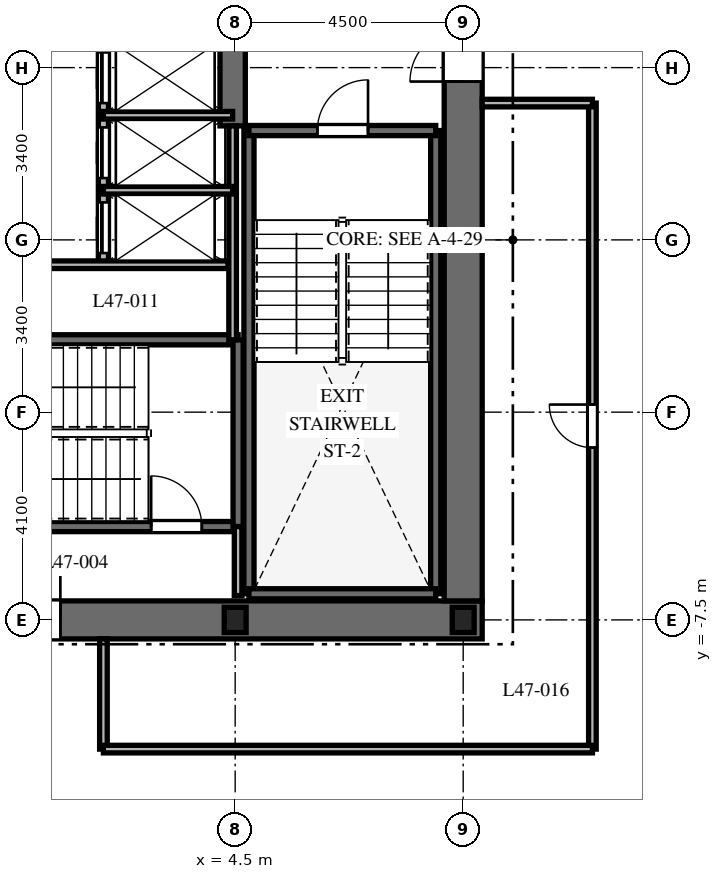
"""IFC4 building model, lengths in metres.
Left out: names, types, materials, properties, quantities, classifications, styles, units other than length and angle.
Written with IfcOpenShell. Run it as: python <this file> out.ifc"""

import sys

from ifc_helpers import new_model, si_unit, direction, frame, frame_2d, origin, origin_2d, place, context, subcontext, project, spatial, rectangle, i_section, extrude, element, fill, save


model = new_model("IFC4")
c1 = context("Model", 3, precision=1e-05, world=origin(), true_north=direction((0.0, 1.0)))
c2 = subcontext(c1, "Body", "Model", "MODEL_VIEW")
j1 = project(units=[si_unit("LENGTHUNIT", "METRE"), si_unit("PLANEANGLEUNIT", "RADIAN")], contexts=[c1])
p1 = place(None, origin())
s1 = spatial("IfcSite", under=j1, at=p1, CompositionType="ELEMENT")
p2 = place(p1, origin())
s2 = spatial("IfcBuilding", under=s1, at=p2, CompositionType="ELEMENT")
p3 = place(p2, frame((0.0, 0.0, 190.4)))
s3 = spatial("IfcBuildingStorey", under=s2, at=p3, CompositionType="ELEMENT", Elevation=190.4)
p4 = place(p3, frame((-9.375, -7.5, 0.0), z_axis=(0.0, 0.0, 1.0), x_axis=(1.0, 0.0, 0.0)))
e1 = element("IfcWall", 1, at=p4, inside=s3, PredefinedType="SHEAR", context=c2, shape_type="SweptSolid", body=[
    extrude(rectangle(XDim=18.75, YDim=0.75, at=frame_2d((9.375, 0.0))), origin(), (0.0, 0.0, 1.0), 3.7),
])
p5 = place(p4, frame((9.425, 0.0, 0.0)))
e2 = element("IfcOpeningElement", 2, at=p5, cuts=e1, PredefinedType="OPENING", context=c2, shape_type="SweptSolid", body=[
    extrude(rectangle(XDim=1.0, YDim=2.15, at=frame_2d((0.5, 1.075))), frame((0.0, 0.385, 0.0), z_axis=(0.0, -1.0, 0.0), x_axis=(1.0, 0.0, 0.0)), (0.0, 0.0, 1.0), 0.77),
])
p6 = place(p3, frame((9.0, -7.125, 0.0), z_axis=(0.0, 0.0, 1.0), x_axis=(0.0, 1.0, 0.0)))
e3 = element("IfcWall", 3, at=p6, inside=s3, PredefinedType="SHEAR", context=c2, shape_type="SweptSolid", body=[
    extrude(rectangle(XDim=14.25, YDim=0.75, at=frame_2d((7.125, 0.0))), origin(), (0.0, 0.0, 1.0), 3.7),
])
p7 = place(p6, frame((10.25, 0.0, 0.0)))
e4 = element("IfcOpeningElement", 4, at=p7, cuts=e3, PredefinedType="OPENING", context=c2, shape_type="SweptSolid", body=[
    extrude(rectangle(XDim=1.05, YDim=2.15, at=frame_2d((0.525, 1.075))), frame((0.0, 0.385, 0.0), z_axis=(0.0, -1.0, 0.0), x_axis=(1.0, 0.0, 0.0)), (0.0, 0.0, 1.0), 0.77),
])
p8 = place(p3, frame((4.45, 2.25, 0.0), z_axis=(0.0, 0.0, 1.0), x_axis=(0.0, 1.0, 0.0)))
e5 = element("IfcWall", 5, at=p8, inside=s3, PredefinedType="SHEAR", context=c2, shape_type="SweptSolid", body=[
    extrude(rectangle(XDim=4.875, YDim=0.5, at=frame_2d((2.438, 0.0))), origin(), (0.0, 0.0, 1.0), 3.7),
])
for number, where, z_axis, x_axis in (
    (6, (4.772, -6.985, 0.0), (0.0, 0.0, 1.0), (0.0, 1.0, 0.0)),
    (7, (8.458, -6.985, 0.0), (0.0, 0.0, 1.0), (0.0, 1.0, 0.0)),
):
    element("IfcWall", number, at=place(p3, frame(where, z_axis=z_axis, x_axis=x_axis)), inside=s3, PredefinedType="SHEAR", context=c2, shape_type="SweptSolid", body=[
        extrude(rectangle(XDim=9.143, YDim=0.2, at=frame_2d((4.572, 0.0))), origin(), (0.0, 0.0, 1.0), 3.7),
    ])
p9 = place(p3, frame((4.772, -6.985, 0.0), z_axis=(0.0, 0.0, 1.0), x_axis=(1.0, 0.0, 0.0)))
e8 = element("IfcWall", 8, at=p9, inside=s3, PredefinedType="SHEAR", context=c2, shape_type="SweptSolid", body=[
    extrude(rectangle(XDim=3.686, YDim=0.2, at=frame_2d((1.843, 0.0))), origin(), (0.0, 0.0, 1.0), 3.7),
])
p10 = place(p3, frame((4.772, 2.158, 0.0), z_axis=(0.0, 0.0, 1.0), x_axis=(1.0, 0.0, 0.0)))
e9 = element("IfcWall", 9, at=p10, inside=s3, PredefinedType="SHEAR", context=c2, shape_type="SweptSolid", body=[
    extrude(rectangle(XDim=3.686, YDim=0.2, at=frame_2d((1.843, 0.0))), origin(), (0.0, 0.0, 1.0), 3.7),
])
p11 = place(p10, frame((1.35, 0.0, 0.0)))
e10 = element("IfcOpeningElement", 10, at=p11, cuts=e9, PredefinedType="OPENING", context=c2, shape_type="SweptSolid", body=[
    extrude(rectangle(XDim=1.0, YDim=2.15, at=frame_2d((0.5, 1.075))), frame((0.0, 0.11, 0.0), z_axis=(0.0, -1.0, 0.0), x_axis=(1.0, 0.0, 0.0)), (0.0, 0.0, 1.0), 0.22),
])
p12 = place(p3, frame((-4.608, -5.658, 0.0), z_axis=(0.0, 0.0, 1.0), x_axis=(1.0, 0.0, 0.0)))
e11 = element("IfcWall", 11, at=p12, inside=s3, PredefinedType="SHEAR", context=c2, shape_type="SweptSolid", body=[
    extrude(rectangle(XDim=9.166, YDim=0.2, at=frame_2d((4.583, 0.0))), origin(), (0.0, 0.0, 1.0), 3.7),
])
p13 = place(p12, frame((7.45, 0.0, 0.0)))
e12 = element("IfcOpeningElement", 12, at=p13, cuts=e11, PredefinedType="OPENING", context=c2, shape_type="SweptSolid", body=[
    extrude(rectangle(XDim=1.0, YDim=2.15, at=frame_2d((0.5, 1.075))), frame((0.0, 0.11, 0.0), z_axis=(0.0, -1.0, 0.0), x_axis=(1.0, 0.0, 0.0)), (0.0, 0.0, 1.0), 0.22),
])
p14 = place(p3, frame((-4.608, -1.972, 0.0), z_axis=(0.0, 0.0, 1.0), x_axis=(1.0, 0.0, 0.0)))
e13 = element("IfcWall", 13, at=p14, inside=s3, PredefinedType="SHEAR", context=c2, shape_type="SweptSolid", body=[
    extrude(rectangle(XDim=9.166, YDim=0.2, at=frame_2d((4.583, 0.0))), origin(), (0.0, 0.0, 1.0), 3.7),
])
p15 = place(p3, frame((4.558, -5.658, 0.0), z_axis=(0.0, 0.0, 1.0), x_axis=(0.0, 1.0, 0.0)))
e14 = element("IfcWall", 14, at=p15, inside=s3, PredefinedType="SHEAR", context=c2, shape_type="SweptSolid", body=[
    extrude(rectangle(XDim=3.686, YDim=0.2, at=frame_2d((1.843, 0.0))), origin(), (0.0, 0.0, 1.0), 3.7),
])
for number, where, z_axis, x_axis in (
    (15, (4.5, -7.5, 0.0), (0.0, 0.0, 1.0), (1.0, 0.0, 0.0)),
    (16, (9.0, -7.5, 0.0), (0.0, 0.0, 1.0), (1.0, 0.0, 0.0)),
):
    element("IfcColumn", number, at=place(p3, frame(where, z_axis=z_axis, x_axis=x_axis)), inside=s3, PredefinedType="COLUMN", context=c2, shape_type="SweptSolid", body=[
        extrude(i_section(OverallWidth=0.432, OverallDepth=0.498, WebThickness=0.056, FlangeThickness=0.089, at=origin_2d()), origin(), (0.0, 0.0, 1.0), 3.7),
    ])
p16 = place(p3, frame((4.558, -7.02, 0.0), z_axis=(0.0, 0.0, 1.0), x_axis=(0.0, 1.0, 0.0)))
e17 = element("IfcWall", 17, at=p16, inside=s3, PredefinedType="PARTITIONING", context=c2, shape_type="SweptSolid", body=[
    extrude(rectangle(XDim=1.362, YDim=0.15, at=frame_2d((0.681, 0.0))), origin(), (0.0, 0.0, 1.0), 3.4),
])
p17 = place(p3, frame((4.45, -1.972, 0.0), z_axis=(0.0, 0.0, 1.0), x_axis=(0.0, 1.0, 0.0)))
e18 = element("IfcWall", 18, at=p17, inside=s3, PredefinedType="PARTITIONING", context=c2, shape_type="SweptSolid", body=[
    extrude(rectangle(XDim=4.222, YDim=0.15, at=frame_2d((2.111, 0.0))), origin(), (0.0, 0.0, 1.0), 3.4),
])
p18 = place(p3, frame((1.9, -0.5, 0.0), z_axis=(0.0, 0.0, 1.0), x_axis=(0.0, 1.0, 0.0)))
e19 = element("IfcWall", 19, at=p18, inside=s3, PredefinedType="PARTITIONING", context=c2, shape_type="SweptSolid", body=[
    extrude(rectangle(XDim=4.44, YDim=0.2, at=frame_2d((2.22, 0.0))), origin(), (0.0, 0.0, 1.0), 3.4),
])
p19 = place(p18, frame((0.24, 0.0, 0.0)))
e20 = element("IfcOpeningElement", 20, at=p19, cuts=e19, PredefinedType="OPENING", context=c2, shape_type="SweptSolid", body=[
    extrude(rectangle(XDim=1.0, YDim=2.2, at=frame_2d((0.5, 1.1))), frame((0.0, 0.11, 0.0), z_axis=(0.0, -1.0, 0.0), x_axis=(1.0, 0.0, 0.0)), (0.0, 0.0, 1.0), 0.22),
])
p20 = place(p18, frame((1.72, 0.0, 0.0)))
e21 = element("IfcOpeningElement", 21, at=p20, cuts=e19, PredefinedType="OPENING", context=c2, shape_type="SweptSolid", body=[
    extrude(rectangle(XDim=1.0, YDim=2.2, at=frame_2d((0.5, 1.1))), frame((0.0, 0.11, 0.0), z_axis=(0.0, -1.0, 0.0), x_axis=(1.0, 0.0, 0.0)), (0.0, 0.0, 1.0), 0.22),
])
p21 = place(p18, frame((3.2, 0.0, 0.0)))
e22 = element("IfcOpeningElement", 22, at=p21, cuts=e19, PredefinedType="OPENING", context=c2, shape_type="SweptSolid", body=[
    extrude(rectangle(XDim=1.0, YDim=2.2, at=frame_2d((0.5, 1.1))), frame((0.0, 0.11, 0.0), z_axis=(0.0, -1.0, 0.0), x_axis=(1.0, 0.0, 0.0)), (0.0, 0.0, 1.0), 0.22),
])
for number, where, z_axis, x_axis in (
    (23, (1.9, 0.98, 0.0), (0.0, 0.0, 1.0), (1.0, 0.0, 0.0)),
    (24, (1.9, 2.46, 0.0), (0.0, 0.0, 1.0), (1.0, 0.0, 0.0)),
):
    element("IfcWall", number, at=place(p3, frame(where, z_axis=z_axis, x_axis=x_axis)), inside=s3, PredefinedType="PARTITIONING", context=c2, shape_type="SweptSolid", body=[
        extrude(rectangle(XDim=2.55, YDim=0.15, at=frame_2d((1.275, 0.0))), origin(), (0.0, 0.0, 1.0), 3.4),
    ])
p22 = place(p3, frame((-4.36, -0.49, 0.0), z_axis=(0.0, 0.0, 1.0), x_axis=(1.0, 0.0, 0.0)))
e25 = element("IfcWall", 25, at=p22, inside=s3, PredefinedType="PARTITIONING", context=c2, shape_type="SweptSolid", body=[
    extrude(rectangle(XDim=8.72, YDim=0.15, at=frame_2d((4.36, 0.0))), origin(), (0.0, 0.0, 1.0), 3.4),
])
p23 = place(p22, frame((3.86, 0.0, 0.0)))
e26 = element("IfcOpeningElement", 26, at=p23, cuts=e25, PredefinedType="OPENING", context=c2, shape_type="SweptSolid", body=[
    extrude(rectangle(XDim=0.9, YDim=2.03, at=frame_2d((0.45, 1.015))), frame((0.0, 0.085, 0.0), z_axis=(0.0, -1.0, 0.0), x_axis=(1.0, 0.0, 0.0)), (0.0, 0.0, 1.0), 0.17),
])
p24 = place(p3, frame((11.55, -10.05, 0.0), z_axis=(0.0, 0.0, 1.0), x_axis=(0.0, 1.0, 0.0)))
e27 = element("IfcWall", 27, at=p24, inside=s3, PredefinedType="PARTITIONING", context=c2, shape_type="SweptSolid", body=[
    extrude(rectangle(XDim=12.75, YDim=0.15, at=frame_2d((6.375, 0.0))), origin(), (0.0, 0.0, 1.0), 2.84),
])
p25 = place(p24, frame((5.95, 0.0, 0.0)))
e28 = element("IfcOpeningElement", 28, at=p25, cuts=e27, PredefinedType="OPENING", context=c2, shape_type="SweptSolid", body=[
    extrude(rectangle(XDim=0.85, YDim=2.03, at=frame_2d((0.425, 1.015))), frame((0.0, 0.085, 0.0), z_axis=(0.0, -1.0, 0.0), x_axis=(1.0, 0.0, 0.0)), (0.0, 0.0, 1.0), 0.17),
])
for number, where, z_axis, x_axis in (
    (29, (11.55, 2.7, 0.0), (0.0, 0.0, 1.0), (-1.0, 0.0, 0.0)),
    (30, (1.9, -7.875, 0.0), (0.0, 0.0, 1.0), (0.0, -1.0, 0.0)),
):
    element("IfcWall", number, at=place(p3, frame(where, z_axis=z_axis, x_axis=x_axis)), inside=s3, PredefinedType="PARTITIONING", context=c2, shape_type="SweptSolid", body=[
        extrude(rectangle(XDim=2.175, YDim=0.15, at=frame_2d((1.087, 0.0))), origin(), (0.0, 0.0, 1.0), 3.4),
    ])
p26 = place(p3, frame((1.9, -10.05, 0.0), z_axis=(0.0, 0.0, 1.0), x_axis=(1.0, 0.0, 0.0)))
e31 = element("IfcWall", 31, at=p26, inside=s3, PredefinedType="PARTITIONING", context=c2, shape_type="SweptSolid", body=[
    extrude(rectangle(XDim=9.65, YDim=0.15, at=frame_2d((4.825, 0.0))), origin(), (0.0, 0.0, 1.0), 2.84),
])
p27 = place(p11, origin())
e32 = element("IfcDoor", 32, at=p27, inside=s3, OperationType="SINGLE_SWING_RIGHT", PredefinedType="DOOR", context=c2, shape_type="SweptSolid", body=[
    extrude(rectangle(XDim=1.0, YDim=2.15, at=frame_2d((0.5, 1.075))), frame((0.0, 0.025, 0.0), z_axis=(0.0, -1.0, 0.0), x_axis=(1.0, 0.0, 0.0)), (0.0, 0.0, 1.0), 0.05),
])
fill(e10, e32)
p28 = place(p13, origin())
e33 = element("IfcDoor", 33, at=p28, inside=s3, OperationType="SINGLE_SWING_LEFT", PredefinedType="DOOR", context=c2, shape_type="SweptSolid", body=[
    extrude(rectangle(XDim=1.0, YDim=2.15, at=frame_2d((0.5, 1.075))), frame((0.0, 0.025, 0.0), z_axis=(0.0, -1.0, 0.0), x_axis=(1.0, 0.0, 0.0)), (0.0, 0.0, 1.0), 0.05),
])
fill(e12, e33)
p29 = place(p5, origin())
e34 = element("IfcDoor", 34, at=p29, inside=s3, OperationType="SINGLE_SWING_RIGHT", PredefinedType="DOOR", context=c2, shape_type="SweptSolid", body=[
    extrude(rectangle(XDim=1.0, YDim=2.15, at=frame_2d((0.5, 1.075))), frame((0.0, 0.025, 0.0), z_axis=(0.0, -1.0, 0.0), x_axis=(1.0, 0.0, 0.0)), (0.0, 0.0, 1.0), 0.05),
])
fill(e2, e34)
p30 = place(p7, origin())
e35 = element("IfcDoor", 35, at=p30, inside=s3, OperationType="SINGLE_SWING_LEFT", PredefinedType="DOOR", context=c2, shape_type="SweptSolid", body=[
    extrude(rectangle(XDim=1.05, YDim=2.15, at=frame_2d((0.525, 1.075))), frame((0.0, 0.025, 0.0), z_axis=(0.0, -1.0, 0.0), x_axis=(1.0, 0.0, 0.0)), (0.0, 0.0, 1.0), 0.05),
])
fill(e4, e35)
p31 = place(p19, origin())
e36 = element("IfcDoor", 36, at=p31, inside=s3, OperationType="SLIDING_TO_RIGHT", PredefinedType="DOOR", context=c2, shape_type="SweptSolid", body=[
    extrude(rectangle(XDim=1.0, YDim=2.2, at=frame_2d((0.5, 1.1))), frame((0.0, 0.025, 0.0), z_axis=(0.0, -1.0, 0.0), x_axis=(1.0, 0.0, 0.0)), (0.0, 0.0, 1.0), 0.05),
])
fill(e20, e36)
p32 = place(p20, origin())
e37 = element("IfcDoor", 37, at=p32, inside=s3, OperationType="SLIDING_TO_RIGHT", PredefinedType="DOOR", context=c2, shape_type="SweptSolid", body=[
    extrude(rectangle(XDim=1.0, YDim=2.2, at=frame_2d((0.5, 1.1))), frame((0.0, 0.025, 0.0), z_axis=(0.0, -1.0, 0.0), x_axis=(1.0, 0.0, 0.0)), (0.0, 0.0, 1.0), 0.05),
])
fill(e21, e37)
p33 = place(p21, origin())
e38 = element("IfcDoor", 38, at=p33, inside=s3, OperationType="SLIDING_TO_RIGHT", PredefinedType="DOOR", context=c2, shape_type="SweptSolid", body=[
    extrude(rectangle(XDim=1.0, YDim=2.2, at=frame_2d((0.5, 1.1))), frame((0.0, 0.025, 0.0), z_axis=(0.0, -1.0, 0.0), x_axis=(1.0, 0.0, 0.0)), (0.0, 0.0, 1.0), 0.05),
])
fill(e22, e38)
p34 = place(p25, origin())
e39 = element("IfcDoor", 39, at=p34, inside=s3, OperationType="SINGLE_SWING_RIGHT", PredefinedType="DOOR", context=c2, shape_type="SweptSolid", body=[
    extrude(rectangle(XDim=0.85, YDim=2.03, at=frame_2d((0.425, 1.015))), frame((0.0, 0.025, 0.0), z_axis=(0.0, -1.0, 0.0), x_axis=(1.0, 0.0, 0.0)), (0.0, 0.0, 1.0), 0.05),
])
fill(e28, e39)
save(model, sys.argv[1])
